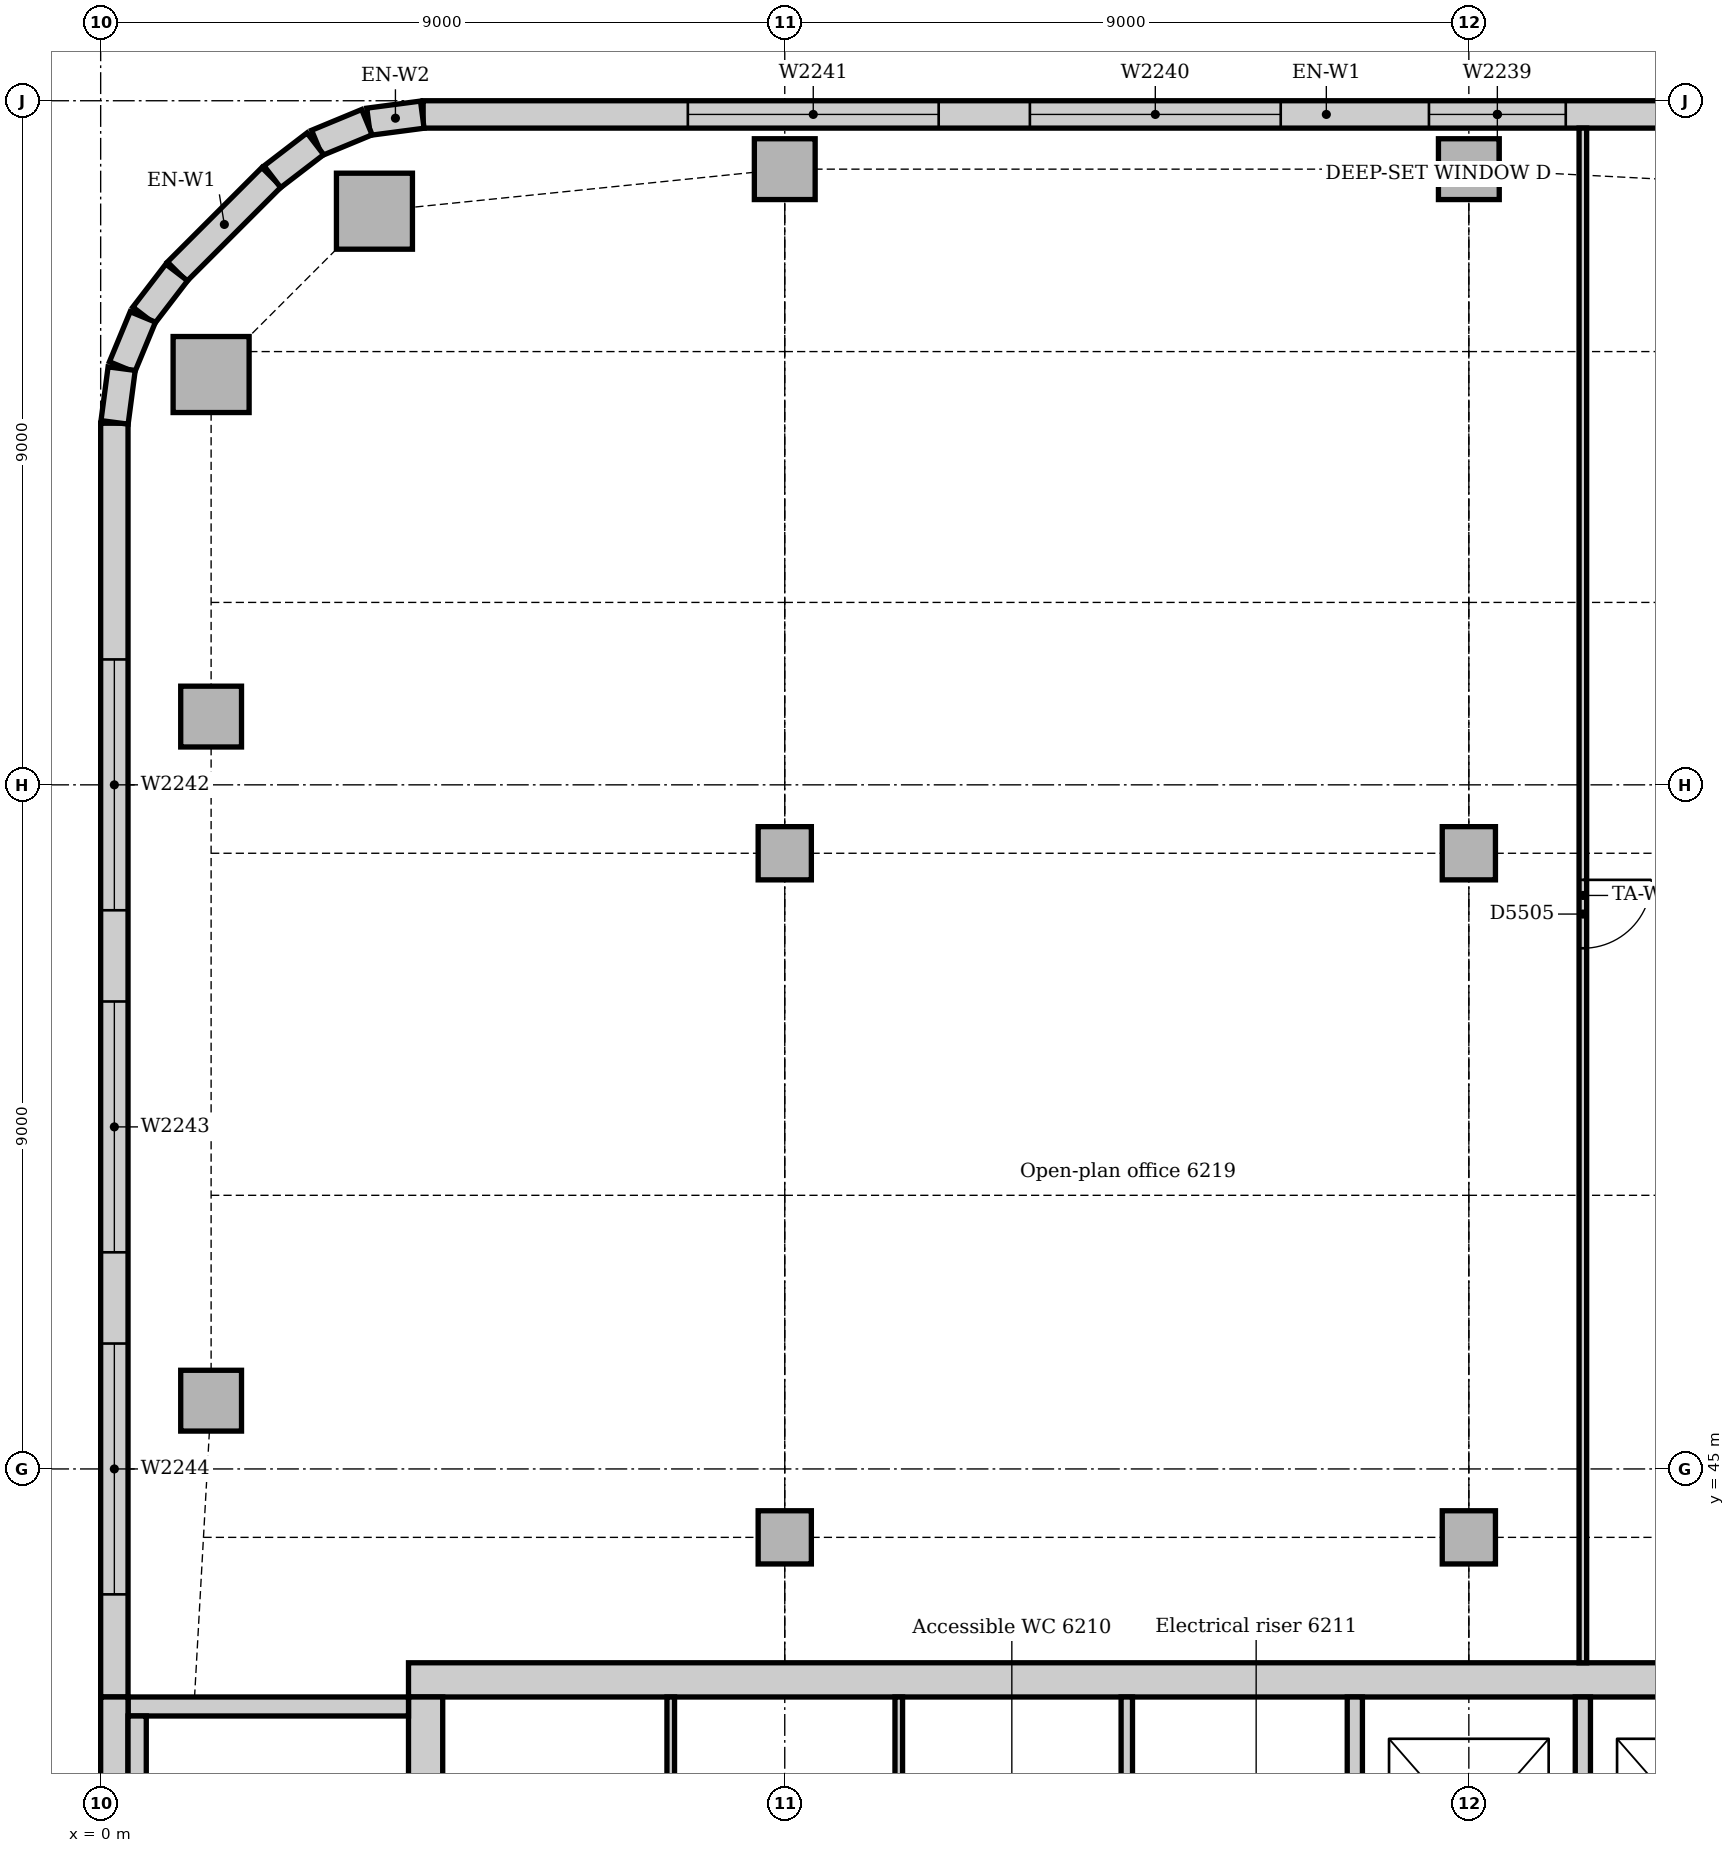
"""IFC4 building model, lengths in metres.
Left out: names, types, materials, properties, quantities, classifications, styles, units other than length and angle.
Written with IfcOpenShell. Run it as: python <this file> out.ifc"""

import sys

from ifc_helpers import new_model, si_unit, direction, frame, frame_2d, origin, origin_2d, place, context, subcontext, project, spatial, rectangle, extrude, element, fill, save


model = new_model("IFC4")
c1 = context("Model", 3, precision=1e-05, world=origin(), true_north=direction((0.0, 1.0)))
c2 = subcontext(c1, "Body", "Model", "MODEL_VIEW")
j1 = project(units=[si_unit("LENGTHUNIT", "METRE"), si_unit("PLANEANGLEUNIT", "RADIAN")], contexts=[c1])
p1 = place(None, origin())
s1 = spatial("IfcSite", under=j1, at=p1, CompositionType="ELEMENT")
p2 = place(p1, origin())
s2 = spatial("IfcBuilding", under=s1, at=p2, CompositionType="ELEMENT")
p3 = place(p2, frame((0.0, 0.0, 259.0)))
s3 = spatial("IfcBuildingStorey", under=s2, at=p3, CompositionType="ELEMENT", Elevation=259.0)
p4 = place(p3, frame((22.95, 42.225, 0.0), z_axis=(0.0, 0.0, 1.0), x_axis=(-1.0, 0.0, 0.0)))
e1 = element("IfcWall", 1, at=p4, inside=s3, PredefinedType="SOLIDWALL", context=c2, shape_type="SweptSolid", body=[
    extrude(rectangle(XDim=18.9, YDim=0.45, at=frame_2d((9.45, 0.0))), origin(), (0.0, 0.0, 1.0), 4.0),
])
p5 = place(p3, frame((4.275, 42.0, 0.0), z_axis=(0.0, 0.0, 1.0), x_axis=(0.0, -1.0, 0.0)))
e2 = element("IfcWall", 2, at=p5, inside=s3, PredefinedType="SOLIDWALL", context=c2, shape_type="SweptSolid", body=[
    extrude(rectangle(XDim=10.5, YDim=0.45, at=frame_2d((5.25, 0.0))), origin(), (0.0, 0.0, 1.0), 4.0),
])
p6 = place(p5, frame((5.3, 0.0, 0.0)))
e3 = element("IfcOpeningElement", 3, at=p6, cuts=e2, PredefinedType="OPENING", context=c2, shape_type="SweptSolid", body=[
    extrude(rectangle(XDim=1.0, YDim=2.1, at=frame_2d((0.5, 1.05))), frame((0.0, 0.235, 0.0), z_axis=(0.0, -1.0, 0.0), x_axis=(1.0, 0.0, 0.0)), (0.0, 0.0, 1.0), 0.47),
])
p7 = place(p3, frame((4.05, 41.875, 0.0), z_axis=(0.0, 0.0, 1.0), x_axis=(-1.0, 0.0, 0.0)))
e4 = element("IfcWall", 4, at=p7, inside=s3, PredefinedType="SOLIDWALL", context=c2, shape_type="SweptSolid", body=[
    extrude(rectangle(XDim=3.69, YDim=0.25, at=frame_2d((1.845, 0.0))), origin(), (0.0, 0.0, 1.0), 4.0),
])
for number, where, z_axis, x_axis in (
    (5, (3.602, 61.547, 0.0), (0.0, 0.0, 1.0), (1.0, 0.0, 0.0)),
    (6, (1.453, 59.398, 0.0), (0.0, 0.0, 1.0), (1.0, 0.0, 0.0)),
):
    element("IfcColumn", number, at=place(p3, frame(where, z_axis=z_axis, x_axis=x_axis)), inside=s3, PredefinedType="COLUMN", context=c2, shape_type="SweptSolid", body=[
        extrude(rectangle(XDim=1.0, YDim=1.0, at=origin_2d()), origin(), (0.0, 0.0, 1.0), 3.85),
    ])
for number, where, z_axis, x_axis in (
    (7, (9.0, 62.1, 0.0), (0.0, 0.0, 1.0), (1.0, 0.0, 0.0)),
    (8, (18.0, 62.1, 0.0), (0.0, 0.0, 1.0), (1.0, 0.0, 0.0)),
    (9, (1.453, 45.898, 0.0), (0.0, 0.0, 1.0), (1.0, 0.0, 0.0)),
    (10, (1.453, 54.898, 0.0), (0.0, 0.0, 1.0), (1.0, 0.0, 0.0)),
):
    element("IfcColumn", number, at=place(p3, frame(where, z_axis=z_axis, x_axis=x_axis)), inside=s3, PredefinedType="COLUMN", context=c2, shape_type="SweptSolid", body=[
        extrude(rectangle(XDim=0.8, YDim=0.8, at=origin_2d()), origin(), (0.0, 0.0, 1.0), 3.85),
    ])
for number, where, z_axis, x_axis in (
    (11, (9.0, 44.1, 0.0), (0.0, 0.0, 1.0), (1.0, 0.0, 0.0)),
    (12, (9.0, 53.1, 0.0), (0.0, 0.0, 1.0), (1.0, 0.0, 0.0)),
    (13, (18.0, 44.1, 0.0), (0.0, 0.0, 1.0), (1.0, 0.0, 0.0)),
    (14, (18.0, 53.1, 0.0), (0.0, 0.0, 1.0), (1.0, 0.0, 0.0)),
):
    element("IfcColumn", number, at=place(p3, frame(where, z_axis=z_axis, x_axis=x_axis)), inside=s3, PredefinedType="COLUMN", context=c2, shape_type="SweptSolid", body=[
        extrude(rectangle(XDim=0.7, YDim=0.7, at=origin_2d()), origin(), (0.0, 0.0, 1.0), 3.85),
    ])
p8 = place(p3, frame((28.007, 62.82, 0.0), z_axis=(0.0, 0.0, 1.0), x_axis=(-1.0, 0.0, 0.0)))
e15 = element("IfcWall", 15, at=p8, inside=s3, PredefinedType="STANDARD", context=c2, shape_type="SweptSolid", body=[
    extrude(rectangle(XDim=23.765, YDim=0.36, at=frame_2d((11.882, 0.0))), origin(), (0.0, 0.0, 1.0), 3.85),
])
p9 = place(p8, frame((3.482, 0.0, 0.9)))
e16 = element("IfcOpeningElement", 16, at=p9, cuts=e15, PredefinedType="OPENING", context=c2, shape_type="SweptSolid", body=[
    extrude(rectangle(XDim=3.3, YDim=1.6, at=frame_2d((1.65, 0.8))), frame((0.0, 0.19, 0.0), z_axis=(0.0, -1.0, 0.0), x_axis=(1.0, 0.0, 0.0)), (0.0, 0.0, 1.0), 0.38),
])
p10 = place(p8, frame((8.732, 0.0, 0.9)))
e17 = element("IfcOpeningElement", 17, at=p10, cuts=e15, PredefinedType="OPENING", context=c2, shape_type="SweptSolid", body=[
    extrude(rectangle(XDim=1.8, YDim=1.6, at=frame_2d((0.9, 0.8))), frame((0.0, 0.19, 0.0), z_axis=(0.0, -1.0, 0.0), x_axis=(1.0, 0.0, 0.0)), (0.0, 0.0, 1.0), 0.38),
])
p11 = place(p8, frame((12.482, 0.0, 0.9)))
e18 = element("IfcOpeningElement", 18, at=p11, cuts=e15, PredefinedType="OPENING", context=c2, shape_type="SweptSolid", body=[
    extrude(rectangle(XDim=3.3, YDim=1.6, at=frame_2d((1.65, 0.8))), frame((0.0, 0.19, 0.0), z_axis=(0.0, -1.0, 0.0), x_axis=(1.0, 0.0, 0.0)), (0.0, 0.0, 1.0), 0.38),
])
p12 = place(p8, frame((16.982, 0.0, 0.9)))
e19 = element("IfcOpeningElement", 19, at=p12, cuts=e15, PredefinedType="OPENING", context=c2, shape_type="SweptSolid", body=[
    extrude(rectangle(XDim=3.3, YDim=1.6, at=frame_2d((1.65, 0.8))), frame((0.0, 0.19, 0.0), z_axis=(0.0, -1.0, 0.0), x_axis=(1.0, 0.0, 0.0)), (0.0, 0.0, 1.0), 0.38),
])
p13 = place(p3, frame((2.249, 61.994, 0.0), z_axis=(0.0, 0.0, 1.0), x_axis=(-0.707106781187, -0.707106781187, 0.0)))
e20 = element("IfcWall", 20, at=p13, inside=s3, PredefinedType="STANDARD", context=c2, shape_type="SweptSolid", body=[
    extrude(rectangle(XDim=1.757, YDim=0.36, at=frame_2d((0.879, 0.0))), origin(), (0.0, 0.0, 1.0), 3.85),
])
p14 = place(p3, frame((0.18, 58.757, 0.0), z_axis=(0.0, 0.0, 1.0), x_axis=(0.0, -1.0, 0.0)))
e21 = element("IfcWall", 21, at=p14, inside=s3, PredefinedType="STANDARD", context=c2, shape_type="SweptSolid", body=[
    extrude(rectangle(XDim=16.757, YDim=0.36, at=frame_2d((8.379, 0.0))), origin(), (0.0, 0.0, 1.0), 3.85),
])
p15 = place(p14, frame((3.107, 0.0, 0.9)))
e22 = element("IfcOpeningElement", 22, at=p15, cuts=e21, PredefinedType="OPENING", context=c2, shape_type="SweptSolid", body=[
    extrude(rectangle(XDim=3.3, YDim=1.6, at=frame_2d((1.65, 0.8))), frame((0.0, 0.19, 0.0), z_axis=(0.0, -1.0, 0.0), x_axis=(1.0, 0.0, 0.0)), (0.0, 0.0, 1.0), 0.38),
])
p16 = place(p14, frame((7.607, 0.0, 0.9)))
e23 = element("IfcOpeningElement", 23, at=p16, cuts=e21, PredefinedType="OPENING", context=c2, shape_type="SweptSolid", body=[
    extrude(rectangle(XDim=3.3, YDim=1.6, at=frame_2d((1.65, 0.8))), frame((0.0, 0.19, 0.0), z_axis=(0.0, -1.0, 0.0), x_axis=(1.0, 0.0, 0.0)), (0.0, 0.0, 1.0), 0.38),
])
p17 = place(p14, frame((12.107, 0.0, 0.9)))
e24 = element("IfcOpeningElement", 24, at=p17, cuts=e21, PredefinedType="OPENING", context=c2, shape_type="SweptSolid", body=[
    extrude(rectangle(XDim=3.3, YDim=1.6, at=frame_2d((1.65, 0.8))), frame((0.0, 0.19, 0.0), z_axis=(0.0, -1.0, 0.0), x_axis=(1.0, 0.0, 0.0)), (0.0, 0.0, 1.0), 0.38),
])
p18 = place(p3, frame((0.18, 42.0, 0.0), z_axis=(0.0, 0.0, 1.0), x_axis=(0.0, -1.0, 0.0)))
e25 = element("IfcWall", 25, at=p18, inside=s3, PredefinedType="STANDARD", context=c2, shape_type="SweptSolid", body=[
    extrude(rectangle(XDim=6.75, YDim=0.36, at=frame_2d((3.375, 0.0))), origin(), (0.0, 0.0, 1.0), 3.85),
])
for number, where, z_axis, x_axis in (
    (26, (4.231, 62.817, 0.0), (0.0, 0.0, 1.0), (-0.991, -0.131, 0.0)),
    (27, (3.503, 62.718, 0.0), (0.0, 0.0, 1.0), (-0.924, -0.383, 0.0)),
):
    element("IfcWall", number, at=place(p3, frame(where, z_axis=z_axis, x_axis=x_axis)), inside=s3, PredefinedType="STANDARD", context=c2, shape_type="SweptSolid", body=[
        extrude(rectangle(XDim=0.713, YDim=0.36, at=frame_2d((0.356, 0.0))), origin(), (0.0, 0.0, 1.0), 3.85),
    ])
for number, where, z_axis, x_axis in (
    (28, (2.825, 62.434, 0.0), (0.0, 0.0, 1.0), (-0.793, -0.609, 0.0)),
    (29, (1.0, 60.741, 0.0), (0.0, 0.0, 1.0), (-0.609, -0.793, 0.0)),
):
    element("IfcWall", number, at=place(p3, frame(where, z_axis=z_axis, x_axis=x_axis)), inside=s3, PredefinedType="STANDARD", context=c2, shape_type="SweptSolid", body=[
        extrude(rectangle(XDim=0.713, YDim=0.36, at=frame_2d((0.357, 0.0))), origin(), (0.0, 0.0, 1.0), 3.85),
    ])
for number, where, z_axis, x_axis in (
    (30, (0.555, 60.156, 0.0), (0.0, 0.0, 1.0), (-0.383, -0.924, 0.0)),
    (31, (0.276, 59.476, 0.0), (0.0, 0.0, 1.0), (-0.131, -0.991, 0.0)),
):
    element("IfcWall", number, at=place(p3, frame(where, z_axis=z_axis, x_axis=x_axis)), inside=s3, PredefinedType="STANDARD", context=c2, shape_type="SweptSolid", body=[
        extrude(rectangle(XDim=0.713, YDim=0.36, at=frame_2d((0.356, 0.0))), origin(), (0.0, 0.0, 1.0), 3.85),
    ])
p19 = place(p3, frame((0.48, 40.13, 0.0), z_axis=(0.0, 0.0, 1.0), x_axis=(0.0, 1.0, 0.0)))
e32 = element("IfcWall", 32, at=p19, inside=s3, PredefinedType="STANDARD", context=c2, shape_type="SweptSolid", body=[
    extrude(rectangle(XDim=1.62, YDim=0.24, at=frame_2d((0.81, 0.0))), origin(), (0.0, 0.0, 1.0), 4.0),
])
for number, where, z_axis, x_axis in (
    (33, (16.5, 38.6, 0.0), (0.0, 0.0, 1.0), (0.0, 1.0, 0.0)),
    (34, (19.5, 38.6, 0.0), (0.0, 0.0, 1.0), (0.0, 1.0, 0.0)),
):
    element("IfcWall", number, at=place(p3, frame(where, z_axis=z_axis, x_axis=x_axis)), inside=s3, PredefinedType="PARTITIONING", context=c2, shape_type="SweptSolid", body=[
        extrude(rectangle(XDim=3.4, YDim=0.2, at=frame_2d((1.7, 0.0))), origin(), (0.0, 0.0, 1.0), 3.85),
    ])
p20 = place(p3, frame((13.5, 38.575, 0.0), z_axis=(0.0, 0.0, 1.0), x_axis=(0.0, 1.0, 0.0)))
e35 = element("IfcWall", 35, at=p20, inside=s3, PredefinedType="PARTITIONING", context=c2, shape_type="SweptSolid", body=[
    extrude(rectangle(XDim=3.425, YDim=0.15, at=frame_2d((1.712, 0.0))), origin(), (0.0, 0.0, 1.0), 3.85),
])
p21 = place(p3, frame((19.5, 42.45, 0.0), z_axis=(0.0, 0.0, 1.0), x_axis=(0.0, 1.0, 0.0)))
e36 = element("IfcWall", 36, at=p21, inside=s3, PredefinedType="PARTITIONING", context=c2, shape_type="SweptSolid", body=[
    extrude(rectangle(XDim=20.19, YDim=0.1, at=frame_2d((10.095, 0.0))), origin(), (0.0, 0.0, 1.0), 3.85),
])
p22 = place(p21, frame((9.4, 0.0, 0.0)))
e37 = element("IfcOpeningElement", 37, at=p22, cuts=e36, PredefinedType="OPENING", context=c2, shape_type="SweptSolid", body=[
    extrude(rectangle(XDim=0.9, YDim=2.1, at=frame_2d((0.45, 1.05))), frame((0.0, 0.06, 0.0), z_axis=(0.0, -1.0, 0.0), x_axis=(1.0, 0.0, 0.0)), (0.0, 0.0, 1.0), 0.12),
])
for number, where, z_axis, x_axis in (
    (38, (7.5, 38.575, 0.0), (0.0, 0.0, 1.0), (0.0, 1.0, 0.0)),
    (39, (10.5, 38.575, 0.0), (0.0, 0.0, 1.0), (0.0, 1.0, 0.0)),
):
    element("IfcWall", number, at=place(p3, frame(where, z_axis=z_axis, x_axis=x_axis)), inside=s3, PredefinedType="PARTITIONING", context=c2, shape_type="SweptSolid", body=[
        extrude(rectangle(XDim=3.425, YDim=0.1, at=frame_2d((1.712, 0.0))), origin(), (0.0, 0.0, 1.0), 3.85),
    ])
p23 = place(p10, origin())
e40 = element("IfcWindow", 40, at=p23, inside=s3, PartitioningType="SINGLE_PANEL", PredefinedType="WINDOW", context=c2, shape_type="SweptSolid", body=[
    extrude(rectangle(XDim=1.8, YDim=1.6, at=frame_2d((0.9, 0.8))), frame((0.0, 0.13, 0.0), z_axis=(0.0, -1.0, 0.0), x_axis=(1.0, 0.0, 0.0)), (0.0, 0.0, 1.0), 0.06),
])
fill(e17, e40)
p24 = place(p11, origin())
e41 = element("IfcWindow", 41, at=p24, inside=s3, PartitioningType="SINGLE_PANEL", PredefinedType="WINDOW", context=c2, shape_type="SweptSolid", body=[
    extrude(rectangle(XDim=3.3, YDim=1.6, at=frame_2d((1.65, 0.8))), frame((0.0, 0.13, 0.0), z_axis=(0.0, -1.0, 0.0), x_axis=(1.0, 0.0, 0.0)), (0.0, 0.0, 1.0), 0.06),
])
fill(e18, e41)
p25 = place(p12, origin())
e42 = element("IfcWindow", 42, at=p25, inside=s3, PartitioningType="SINGLE_PANEL", PredefinedType="WINDOW", context=c2, shape_type="SweptSolid", body=[
    extrude(rectangle(XDim=3.3, YDim=1.6, at=frame_2d((1.65, 0.8))), frame((0.0, 0.13, 0.0), z_axis=(0.0, -1.0, 0.0), x_axis=(1.0, 0.0, 0.0)), (0.0, 0.0, 1.0), 0.06),
])
fill(e19, e42)
p26 = place(p15, origin())
e43 = element("IfcWindow", 43, at=p26, inside=s3, PartitioningType="SINGLE_PANEL", PredefinedType="WINDOW", context=c2, shape_type="SweptSolid", body=[
    extrude(rectangle(XDim=3.3, YDim=1.6, at=frame_2d((1.65, 0.8))), frame((0.0, 0.13, 0.0), z_axis=(0.0, -1.0, 0.0), x_axis=(1.0, 0.0, 0.0)), (0.0, 0.0, 1.0), 0.06),
])
fill(e22, e43)
p27 = place(p16, origin())
e44 = element("IfcWindow", 44, at=p27, inside=s3, PartitioningType="SINGLE_PANEL", PredefinedType="WINDOW", context=c2, shape_type="SweptSolid", body=[
    extrude(rectangle(XDim=3.3, YDim=1.6, at=frame_2d((1.65, 0.8))), frame((0.0, 0.13, 0.0), z_axis=(0.0, -1.0, 0.0), x_axis=(1.0, 0.0, 0.0)), (0.0, 0.0, 1.0), 0.06),
])
fill(e23, e44)
p28 = place(p17, origin())
e45 = element("IfcWindow", 45, at=p28, inside=s3, PartitioningType="SINGLE_PANEL", PredefinedType="WINDOW", context=c2, shape_type="SweptSolid", body=[
    extrude(rectangle(XDim=3.3, YDim=1.6, at=frame_2d((1.65, 0.8))), frame((0.0, 0.13, 0.0), z_axis=(0.0, -1.0, 0.0), x_axis=(1.0, 0.0, 0.0)), (0.0, 0.0, 1.0), 0.06),
])
fill(e24, e45)
p29 = place(p22, frame((0.9, 0.0, 0.0), z_axis=(0.0, 0.0, 1.0), x_axis=(-1.0, 0.0, 0.0)))
e46 = element("IfcDoor", 46, at=p29, inside=s3, OperationType="SINGLE_SWING_LEFT", PredefinedType="DOOR", context=c2, shape_type="SweptSolid", body=[
    extrude(rectangle(XDim=0.9, YDim=2.1, at=frame_2d((0.45, 1.05))), frame((0.0, 0.025, 0.0), z_axis=(0.0, -1.0, 0.0), x_axis=(1.0, 0.0, 0.0)), (0.0, 0.0, 1.0), 0.05),
])
fill(e37, e46)
save(model, sys.argv[1])
